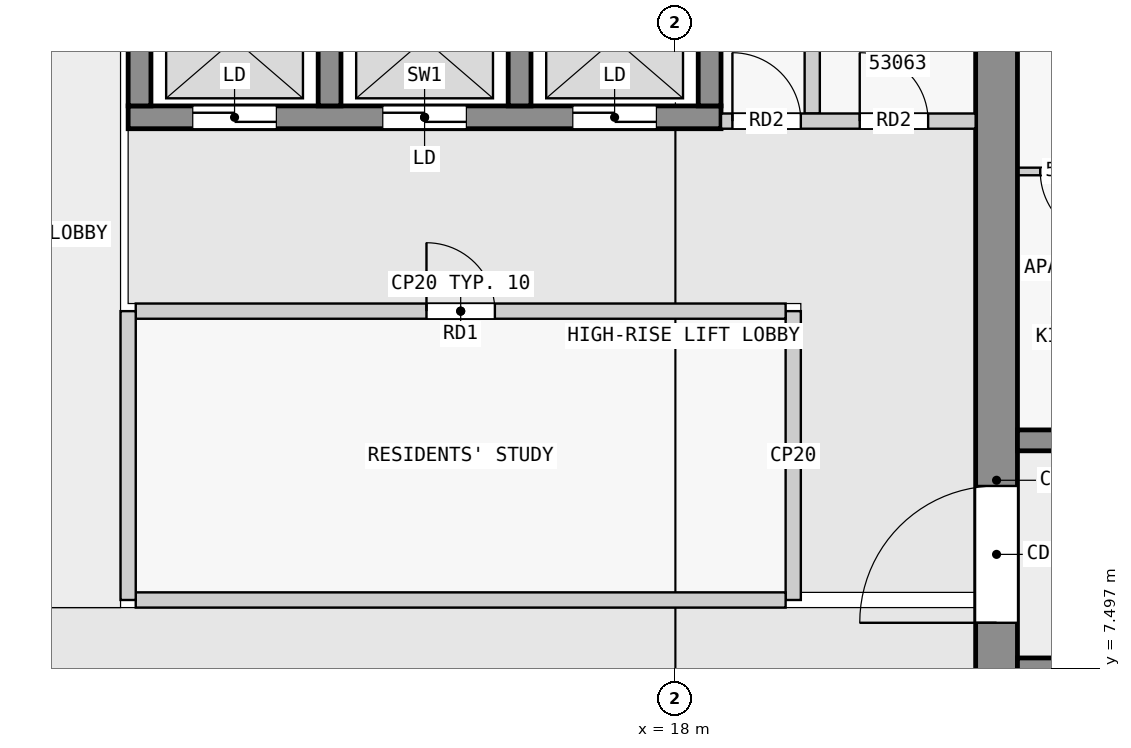
"""IFC4 building model, lengths in metres.
Left out: names, types, materials, properties, quantities, classifications, styles, units other than length and angle.
Written with IfcOpenShell. Run it as: python <this file> out.ifc"""

import sys

from ifc_helpers import new_model, si_unit, direction, frame, frame_2d, origin, place, context, subcontext, project, spatial, rectangle, extrude, element, fill, save


model = new_model("IFC4")
c1 = context("Model", 3, precision=1e-05, world=origin(), true_north=direction((0.0, 1.0)))
c2 = subcontext(c1, "Body", "Model", "MODEL_VIEW")
j1 = project(units=[si_unit("LENGTHUNIT", "METRE"), si_unit("PLANEANGLEUNIT", "RADIAN")], contexts=[c1])
p1 = place(None, origin())
s1 = spatial("IfcSite", under=j1, at=p1, CompositionType="ELEMENT")
p2 = place(p1, origin())
s2 = spatial("IfcBuilding", under=s1, at=p2, CompositionType="ELEMENT")
p3 = place(p2, frame((0.0, 0.0, 204.9)))
s3 = spatial("IfcBuildingStorey", under=s2, at=p3, CompositionType="ELEMENT", Elevation=204.9)
p4 = place(p3, frame((22.225, 2.5, 0.0), z_axis=(0.0, 0.0, 1.0), x_axis=(0.0, 1.0, 0.0)))
e1 = element("IfcWall", 1, at=p4, inside=s3, PredefinedType="SHEAR", context=c2, shape_type="SweptSolid", body=[
    extrude(rectangle(XDim=14.95, YDim=0.55, at=frame_2d((7.475, 0.0))), origin(), (0.0, 0.0, 1.0), 3.25),
])
p5 = place(p4, frame((5.6, 0.0, 0.0)))
e2 = element("IfcOpeningElement", 2, at=p5, cuts=e1, PredefinedType="OPENING", context=c2, shape_type="SweptSolid", body=[
    extrude(rectangle(XDim=1.8, YDim=2.1, at=frame_2d((0.9, 1.05))), frame((0.0, 0.285, 0.0), z_axis=(0.0, -1.0, 0.0), x_axis=(1.0, 0.0, 0.0)), (0.0, 0.0, 1.0), 0.57),
])
p6 = place(p3, frame((10.8, 14.75, 0.0), z_axis=(0.0, 0.0, 1.0), x_axis=(1.0, 0.0, 0.0)))
e3 = element("IfcWall", 3, at=p6, inside=s3, PredefinedType="SHEAR", context=c2, shape_type="SweptSolid", body=[
    extrude(rectangle(XDim=7.8, YDim=0.3, at=frame_2d((3.9, 0.0))), origin(), (0.0, 0.0, 1.0), 3.25),
])
p7 = place(p6, frame((0.85, 0.0, 0.0)))
e4 = element("IfcOpeningElement", 4, at=p7, cuts=e3, PredefinedType="OPENING", context=c2, shape_type="SweptSolid", body=[
    extrude(rectangle(XDim=1.1, YDim=2.1, at=frame_2d((0.55, 1.05))), frame((0.0, 0.16, 0.0), z_axis=(0.0, -1.0, 0.0), x_axis=(1.0, 0.0, 0.0)), (0.0, 0.0, 1.0), 0.32),
])
p8 = place(p6, frame((3.35, 0.0, 0.0)))
e5 = element("IfcOpeningElement", 5, at=p8, cuts=e3, PredefinedType="OPENING", context=c2, shape_type="SweptSolid", body=[
    extrude(rectangle(XDim=1.1, YDim=2.1, at=frame_2d((0.55, 1.05))), frame((0.0, 0.16, 0.0), z_axis=(0.0, -1.0, 0.0), x_axis=(1.0, 0.0, 0.0)), (0.0, 0.0, 1.0), 0.32),
])
p9 = place(p6, frame((5.85, 0.0, 0.0)))
e6 = element("IfcOpeningElement", 6, at=p9, cuts=e3, PredefinedType="OPENING", context=c2, shape_type="SweptSolid", body=[
    extrude(rectangle(XDim=1.1, YDim=2.1, at=frame_2d((0.55, 1.05))), frame((0.0, 0.16, 0.0), z_axis=(0.0, -1.0, 0.0), x_axis=(1.0, 0.0, 0.0)), (0.0, 0.0, 1.0), 0.32),
])
for number, where, z_axis, x_axis in (
    (7, (10.95, 14.9, 0.0), (0.0, 0.0, 1.0), (0.0, 1.0, 0.0)),
    (8, (13.45, 14.9, 0.0), (0.0, 0.0, 1.0), (0.0, 1.0, 0.0)),
    (9, (15.95, 14.9, 0.0), (0.0, 0.0, 1.0), (0.0, 1.0, 0.0)),
    (10, (18.45, 14.9, 0.0), (0.0, 0.0, 1.0), (0.0, 1.0, 0.0)),
):
    element("IfcWall", number, at=place(p3, frame(where, z_axis=z_axis, x_axis=x_axis)), inside=s3, PredefinedType="SHEAR", context=c2, shape_type="SweptSolid", body=[
        extrude(rectangle(XDim=2.0, YDim=0.3, at=frame_2d((1.0, 0.0))), origin(), (0.0, 0.0, 1.0), 3.25),
    ])
p10 = place(p3, frame((22.5, 7.5, 0.0), z_axis=(0.0, 0.0, 1.0), x_axis=(1.0, 0.0, 0.0)))
e11 = element("IfcWall", 11, at=p10, inside=s3, PredefinedType="SHEAR", context=c2, shape_type="SweptSolid", body=[
    extrude(rectangle(XDim=22.5, YDim=0.275, at=frame_2d((11.25, 0.0))), origin(), (0.0, 0.0, 1.0), 3.25),
])
p11 = place(p10, frame((4.05, 0.0, 0.0)))
e12 = element("IfcOpeningElement", 12, at=p11, cuts=e11, PredefinedType="OPENING", context=c2, shape_type="SweptSolid", body=[
    extrude(rectangle(XDim=1.0, YDim=2.1, at=frame_2d((0.5, 1.05))), frame((0.0, 0.147, 0.0), z_axis=(0.0, -1.0, 0.0), x_axis=(1.0, 0.0, 0.0)), (0.0, 0.0, 1.0), 0.295),
])
p12 = place(p10, frame((10.35, 0.0, 0.0)))
e13 = element("IfcOpeningElement", 13, at=p12, cuts=e11, PredefinedType="OPENING", context=c2, shape_type="SweptSolid", body=[
    extrude(rectangle(XDim=1.8, YDim=2.1, at=frame_2d((0.9, 1.05))), frame((0.0, 0.147, 0.0), z_axis=(0.0, -1.0, 0.0), x_axis=(1.0, 0.0, 0.0)), (0.0, 0.0, 1.0), 0.295),
])
p13 = place(p10, frame((16.85, 0.0, 0.0)))
e14 = element("IfcOpeningElement", 14, at=p13, cuts=e11, PredefinedType="OPENING", context=c2, shape_type="SweptSolid", body=[
    extrude(rectangle(XDim=1.0, YDim=2.1, at=frame_2d((0.5, 1.05))), frame((0.0, 0.147, 0.0), z_axis=(0.0, -1.0, 0.0), x_axis=(1.0, 0.0, 0.0)), (0.0, 0.0, 1.0), 0.295),
])
p14 = place(p3, frame((22.5, 10.5, 0.0), z_axis=(0.0, 0.0, 1.0), x_axis=(1.0, 0.0, 0.0)))
e15 = element("IfcWall", 15, at=p14, inside=s3, PredefinedType="SHEAR", context=c2, shape_type="SweptSolid", body=[
    extrude(rectangle(XDim=22.5, YDim=0.275, at=frame_2d((11.25, 0.0))), origin(), (0.0, 0.0, 1.0), 3.25),
])
p15 = place(p14, frame((7.75, 0.0, 0.0)))
e16 = element("IfcOpeningElement", 16, at=p15, cuts=e15, PredefinedType="OPENING", context=c2, shape_type="SweptSolid", body=[
    extrude(rectangle(XDim=1.0, YDim=2.1, at=frame_2d((0.5, 1.05))), frame((0.0, 0.147, 0.0), z_axis=(0.0, -1.0, 0.0), x_axis=(1.0, 0.0, 0.0)), (0.0, 0.0, 1.0), 0.295),
])
p16 = place(p14, frame((18.75, 0.0, 0.0)))
e17 = element("IfcOpeningElement", 17, at=p16, cuts=e15, PredefinedType="OPENING", context=c2, shape_type="SweptSolid", body=[
    extrude(rectangle(XDim=0.9, YDim=2.1, at=frame_2d((0.45, 1.05))), frame((0.0, 0.147, 0.0), z_axis=(0.0, -1.0, 0.0), x_axis=(1.0, 0.0, 0.0)), (0.0, 0.0, 1.0), 0.295),
])
p17 = place(p14, frame((20.95, 0.0, 0.0)))
e18 = element("IfcOpeningElement", 18, at=p17, cuts=e15, PredefinedType="OPENING", context=c2, shape_type="SweptSolid", body=[
    extrude(rectangle(XDim=1.0, YDim=2.1, at=frame_2d((0.5, 1.05))), frame((0.0, 0.147, 0.0), z_axis=(0.0, -1.0, 0.0), x_axis=(1.0, 0.0, 0.0)), (0.0, 0.0, 1.0), 0.295),
])
p18 = place(p3, frame((10.8, 8.4, 0.0), z_axis=(0.0, 0.0, 1.0), x_axis=(0.0, 1.0, 0.0)))
e19 = element("IfcWall", 19, at=p18, inside=s3, PredefinedType="PARTITIONING", context=c2, shape_type="SweptSolid", body=[
    extrude(rectangle(XDim=3.8, YDim=0.2, at=frame_2d((1.9, 0.0))), origin(), (0.0, 0.0, 1.0), 3.25),
])
p19 = place(p3, frame((10.9, 8.4, 0.0), z_axis=(0.0, 0.0, 1.0), x_axis=(1.0, 0.0, 0.0)))
e20 = element("IfcWall", 20, at=p19, inside=s3, PredefinedType="PARTITIONING", context=c2, shape_type="SweptSolid", body=[
    extrude(rectangle(XDim=8.55, YDim=0.2, at=frame_2d((4.275, 0.0))), origin(), (0.0, 0.0, 1.0), 3.25),
])
p20 = place(p3, frame((19.55, 8.4, 0.0), z_axis=(0.0, 0.0, 1.0), x_axis=(0.0, 1.0, 0.0)))
e21 = element("IfcWall", 21, at=p20, inside=s3, PredefinedType="PARTITIONING", context=c2, shape_type="SweptSolid", body=[
    extrude(rectangle(XDim=3.8, YDim=0.2, at=frame_2d((1.9, 0.0))), origin(), (0.0, 0.0, 1.0), 3.25),
])
p21 = place(p3, frame((10.9, 12.2, 0.0), z_axis=(0.0, 0.0, 1.0), x_axis=(1.0, 0.0, 0.0)))
e22 = element("IfcWall", 22, at=p21, inside=s3, PredefinedType="PARTITIONING", context=c2, shape_type="SweptSolid", body=[
    extrude(rectangle(XDim=8.55, YDim=0.2, at=frame_2d((4.275, 0.0))), origin(), (0.0, 0.0, 1.0), 3.25),
])
p22 = place(p21, frame((3.825, 0.0, 0.0)))
e23 = element("IfcOpeningElement", 23, at=p22, cuts=e22, PredefinedType="OPENING", context=c2, shape_type="SweptSolid", body=[
    extrude(rectangle(XDim=0.9, YDim=2.1, at=frame_2d((0.45, 1.05))), frame((0.0, 0.11, 0.0), z_axis=(0.0, -1.0, 0.0), x_axis=(1.0, 0.0, 0.0)), (0.0, 0.0, 1.0), 0.22),
])
p23 = place(p3, frame((18.6, 14.7, 0.0), z_axis=(0.0, 0.0, 1.0), x_axis=(1.0, 0.0, 0.0)))
e24 = element("IfcWall", 24, at=p23, inside=s3, PredefinedType="PARTITIONING", context=c2, shape_type="SweptSolid", body=[
    extrude(rectangle(XDim=3.35, YDim=0.2, at=frame_2d((1.675, 0.0))), origin(), (0.0, 0.0, 1.0), 3.25),
])
p24 = place(p23, frame((0.15, 0.0, 0.0)))
e25 = element("IfcOpeningElement", 25, at=p24, cuts=e24, PredefinedType="OPENING", context=c2, shape_type="SweptSolid", body=[
    extrude(rectangle(XDim=0.9, YDim=2.1, at=frame_2d((0.45, 1.05))), frame((0.0, 0.11, 0.0), z_axis=(0.0, -1.0, 0.0), x_axis=(1.0, 0.0, 0.0)), (0.0, 0.0, 1.0), 0.22),
])
p25 = place(p23, frame((1.825, 0.0, 0.0)))
e26 = element("IfcOpeningElement", 26, at=p25, cuts=e24, PredefinedType="OPENING", context=c2, shape_type="SweptSolid", body=[
    extrude(rectangle(XDim=0.9, YDim=2.1, at=frame_2d((0.45, 1.05))), frame((0.0, 0.11, 0.0), z_axis=(0.0, -1.0, 0.0), x_axis=(1.0, 0.0, 0.0)), (0.0, 0.0, 1.0), 0.22),
])
p26 = place(p3, frame((19.8, 14.8, 0.0), z_axis=(0.0, 0.0, 1.0), x_axis=(0.0, 1.0, 0.0)))
e27 = element("IfcWall", 27, at=p26, inside=s3, PredefinedType="PARTITIONING", context=c2, shape_type="SweptSolid", body=[
    extrude(rectangle(XDim=2.65, YDim=0.2, at=frame_2d((1.325, 0.0))), origin(), (0.0, 0.0, 1.0), 3.25),
])
p27 = place(p3, frame((24.05, 14.038, 0.0), z_axis=(0.0, 0.0, 1.0), x_axis=(-1.0, 0.0, 0.0)))
e28 = element("IfcWall", 28, at=p27, inside=s3, PredefinedType="PARTITIONING", context=c2, shape_type="SweptSolid", body=[
    extrude(rectangle(XDim=1.55, YDim=0.1, at=frame_2d((0.775, 0.0))), origin(), (0.0, 0.0, 1.0), 3.25),
])
p28 = place(p27, frame((0.35, 0.0, 0.0)))
e29 = element("IfcOpeningElement", 29, at=p28, cuts=e28, PredefinedType="OPENING", context=c2, shape_type="SweptSolid", body=[
    extrude(rectangle(XDim=0.9, YDim=2.1, at=frame_2d((0.45, 1.05))), frame((0.0, 0.06, 0.0), z_axis=(0.0, -1.0, 0.0), x_axis=(1.0, 0.0, 0.0)), (0.0, 0.0, 1.0), 0.12),
])
p29 = place(p22, origin())
e30 = element("IfcDoor", 30, at=p29, inside=s3, OperationType="SINGLE_SWING_LEFT", PredefinedType="DOOR", context=c2, shape_type="SweptSolid", body=[
    extrude(rectangle(XDim=0.9, YDim=2.1, at=frame_2d((0.45, 1.05))), frame((0.0, 0.025, 0.0), z_axis=(0.0, -1.0, 0.0), x_axis=(1.0, 0.0, 0.0)), (0.0, 0.0, 1.0), 0.05),
])
fill(e23, e30)
p30 = place(p7, origin())
e31 = element("IfcDoor", 31, at=p30, inside=s3, OperationType="DOUBLE_DOOR_SLIDING", PredefinedType="DOOR", context=c2, shape_type="SweptSolid", body=[
    extrude(rectangle(XDim=1.1, YDim=2.1, at=frame_2d((0.55, 1.05))), frame((0.0, 0.025, 0.0), z_axis=(0.0, -1.0, 0.0), x_axis=(1.0, 0.0, 0.0)), (0.0, 0.0, 1.0), 0.05),
])
fill(e4, e31)
p31 = place(p8, origin())
e32 = element("IfcDoor", 32, at=p31, inside=s3, OperationType="DOUBLE_DOOR_SLIDING", PredefinedType="DOOR", context=c2, shape_type="SweptSolid", body=[
    extrude(rectangle(XDim=1.1, YDim=2.1, at=frame_2d((0.55, 1.05))), frame((0.0, 0.025, 0.0), z_axis=(0.0, -1.0, 0.0), x_axis=(1.0, 0.0, 0.0)), (0.0, 0.0, 1.0), 0.05),
])
fill(e5, e32)
p32 = place(p9, origin())
e33 = element("IfcDoor", 33, at=p32, inside=s3, OperationType="DOUBLE_DOOR_SLIDING", PredefinedType="DOOR", context=c2, shape_type="SweptSolid", body=[
    extrude(rectangle(XDim=1.1, YDim=2.1, at=frame_2d((0.55, 1.05))), frame((0.0, 0.025, 0.0), z_axis=(0.0, -1.0, 0.0), x_axis=(1.0, 0.0, 0.0)), (0.0, 0.0, 1.0), 0.05),
])
fill(e6, e33)
p33 = place(p5, origin())
e34 = element("IfcDoor", 34, at=p33, inside=s3, OperationType="DOUBLE_DOOR_SINGLE_SWING", PredefinedType="DOOR", context=c2, shape_type="SweptSolid", body=[
    extrude(rectangle(XDim=1.8, YDim=2.1, at=frame_2d((0.9, 1.05))), frame((0.0, 0.025, 0.0), z_axis=(0.0, -1.0, 0.0), x_axis=(1.0, 0.0, 0.0)), (0.0, 0.0, 1.0), 0.05),
])
fill(e2, e34)
p34 = place(p24, origin())
e35 = element("IfcDoor", 35, at=p34, inside=s3, OperationType="SINGLE_SWING_LEFT", PredefinedType="DOOR", context=c2, shape_type="SweptSolid", body=[
    extrude(rectangle(XDim=0.9, YDim=2.1, at=frame_2d((0.45, 1.05))), frame((0.0, 0.025, 0.0), z_axis=(0.0, -1.0, 0.0), x_axis=(1.0, 0.0, 0.0)), (0.0, 0.0, 1.0), 0.05),
])
fill(e25, e35)
p35 = place(p25, origin())
e36 = element("IfcDoor", 36, at=p35, inside=s3, OperationType="SINGLE_SWING_LEFT", PredefinedType="DOOR", context=c2, shape_type="SweptSolid", body=[
    extrude(rectangle(XDim=0.9, YDim=2.1, at=frame_2d((0.45, 1.05))), frame((0.0, 0.025, 0.0), z_axis=(0.0, -1.0, 0.0), x_axis=(1.0, 0.0, 0.0)), (0.0, 0.0, 1.0), 0.05),
])
fill(e26, e36)
p36 = place(p28, origin())
e37 = element("IfcDoor", 37, at=p36, inside=s3, OperationType="SINGLE_SWING_RIGHT", PredefinedType="DOOR", context=c2, shape_type="SweptSolid", body=[
    extrude(rectangle(XDim=0.9, YDim=2.1, at=frame_2d((0.45, 1.05))), frame((0.0, 0.025, 0.0), z_axis=(0.0, -1.0, 0.0), x_axis=(1.0, 0.0, 0.0)), (0.0, 0.0, 1.0), 0.05),
])
fill(e29, e37)
save(model, sys.argv[1])
